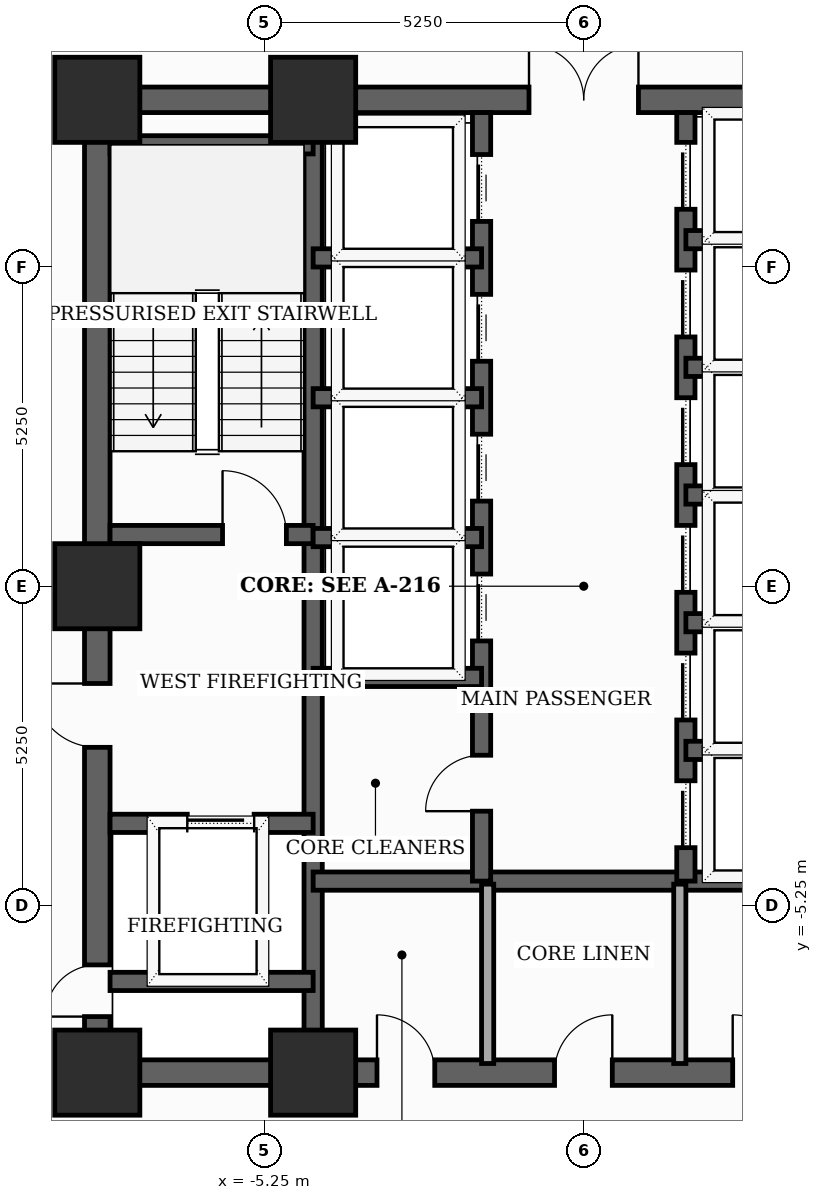
"""IFC4 building model, lengths in metres.
Left out: names, types, materials, properties, quantities, classifications, styles, units other than length and angle.
Written with IfcOpenShell. Run it as: python <this file> out.ifc"""

import sys

from ifc_helpers import new_model, si_unit, direction, frame, frame_2d, origin, origin_2d, place, context, subcontext, project, spatial, rectangle, extrude, element, fill, save


model = new_model("IFC4")
c1 = context("Model", 3, precision=1e-05, world=origin(), true_north=direction((0.0, 1.0)))
c2 = subcontext(c1, "Body", "Model", "MODEL_VIEW")
j1 = project(units=[si_unit("LENGTHUNIT", "METRE"), si_unit("PLANEANGLEUNIT", "RADIAN")], contexts=[c1])
p1 = place(None, origin())
s1 = spatial("IfcSite", under=j1, at=p1, CompositionType="ELEMENT")
p2 = place(p1, origin())
s2 = spatial("IfcBuilding", under=s1, at=p2, CompositionType="ELEMENT")
p3 = place(p2, frame((0.0, 0.0, 108.8)))
s3 = spatial("IfcBuildingStorey", under=s2, at=p3, CompositionType="ELEMENT", Elevation=108.8)
for number, where, z_axis, x_axis in (
    (1, (-8.0, -8.0, 0.0), (0.0, 0.0, 1.0), (1.0, 0.0, 0.0)),
    (2, (-4.45, -8.0, 0.0), (0.0, 0.0, 1.0), (1.0, 0.0, 0.0)),
    (3, (-4.45, 8.0, 0.0), (0.0, 0.0, 1.0), (1.0, 0.0, 0.0)),
    (4, (-8.0, 8.0, 0.0), (0.0, 0.0, 1.0), (1.0, 0.0, 0.0)),
    (5, (-8.0, 0.0, 0.0), (0.0, 0.0, 1.0), (1.0, 0.0, 0.0)),
):
    element("IfcColumn", number, at=place(p3, frame(where, z_axis=z_axis, x_axis=x_axis)), inside=s3, PredefinedType="COLUMN", context=c2, shape_type="SweptSolid", body=[
        extrude(rectangle(XDim=1.4, YDim=1.4, at=origin_2d()), origin(), (0.0, 0.0, 1.0), 3.7),
    ])
p4 = place(p3, frame((-8.0, -8.0, 0.0), z_axis=(0.0, 0.0, 1.0), x_axis=(0.0, 1.0, 0.0)))
e6 = element("IfcWall", 6, at=p4, inside=s3, PredefinedType="SHEAR", context=c2, shape_type="SweptSolid", body=[
    extrude(rectangle(XDim=16.0, YDim=0.42, at=frame_2d((8.0, 0.0))), origin(), (0.0, 0.0, 1.0), 3.5),
])
p5 = place(p4, frame((0.922, 0.0, 0.0)))
e7 = element("IfcOpeningElement", 7, at=p5, cuts=e6, PredefinedType="OPENING", context=c2, shape_type="SweptSolid", body=[
    extrude(rectangle(XDim=0.85, YDim=2.02, at=frame_2d((0.425, 1.01))), frame((0.0, 0.22, 0.0), z_axis=(0.0, -1.0, 0.0), x_axis=(1.0, 0.0, 0.0)), (0.0, 0.0, 1.0), 0.44),
])
p6 = place(p4, frame((5.35, 0.0, 0.0)))
e8 = element("IfcOpeningElement", 8, at=p6, cuts=e6, PredefinedType="OPENING", context=c2, shape_type="SweptSolid", body=[
    extrude(rectangle(XDim=1.05, YDim=2.15, at=frame_2d((0.525, 1.075))), frame((0.0, 0.22, 0.0), z_axis=(0.0, -1.0, 0.0), x_axis=(1.0, 0.0, 0.0)), (0.0, 0.0, 1.0), 0.44),
])
p7 = place(p3, frame((-8.0, -8.0, 0.0), z_axis=(0.0, 0.0, 1.0), x_axis=(1.0, 0.0, 0.0)))
e9 = element("IfcWall", 9, at=p7, inside=s3, PredefinedType="SHEAR", context=c2, shape_type="SweptSolid", body=[
    extrude(rectangle(XDim=16.0, YDim=0.42, at=frame_2d((8.0, 0.0))), origin(), (0.0, 0.0, 1.0), 3.5),
])
p8 = place(p7, frame((4.6, 0.0, 0.0)))
e10 = element("IfcOpeningElement", 10, at=p8, cuts=e9, PredefinedType="OPENING", context=c2, shape_type="SweptSolid", body=[
    extrude(rectangle(XDim=0.95, YDim=2.1, at=frame_2d((0.475, 1.05))), frame((0.0, 0.22, 0.0), z_axis=(0.0, -1.0, 0.0), x_axis=(1.0, 0.0, 0.0)), (0.0, 0.0, 1.0), 0.44),
])
p9 = place(p7, frame((7.52, 0.0, 0.0)))
e11 = element("IfcOpeningElement", 11, at=p9, cuts=e9, PredefinedType="OPENING", context=c2, shape_type="SweptSolid", body=[
    extrude(rectangle(XDim=0.95, YDim=2.1, at=frame_2d((0.475, 1.05))), frame((0.0, 0.22, 0.0), z_axis=(0.0, -1.0, 0.0), x_axis=(1.0, 0.0, 0.0)), (0.0, 0.0, 1.0), 0.44),
])
p10 = place(p7, frame((10.45, 0.0, 0.0)))
e12 = element("IfcOpeningElement", 12, at=p10, cuts=e9, PredefinedType="OPENING", context=c2, shape_type="SweptSolid", body=[
    extrude(rectangle(XDim=0.95, YDim=2.1, at=frame_2d((0.475, 1.05))), frame((0.0, 0.22, 0.0), z_axis=(0.0, -1.0, 0.0), x_axis=(1.0, 0.0, 0.0)), (0.0, 0.0, 1.0), 0.44),
])
p11 = place(p3, frame((-8.0, 8.0, 0.0), z_axis=(0.0, 0.0, 1.0), x_axis=(1.0, 0.0, 0.0)))
e13 = element("IfcWall", 13, at=p11, inside=s3, PredefinedType="SHEAR", context=c2, shape_type="SweptSolid", body=[
    extrude(rectangle(XDim=16.0, YDim=0.42, at=frame_2d((8.0, 0.0))), origin(), (0.0, 0.0, 1.0), 3.5),
])
p12 = place(p11, frame((7.1, 0.0, 0.0)))
e14 = element("IfcOpeningElement", 14, at=p12, cuts=e13, PredefinedType="OPENING", context=c2, shape_type="SweptSolid", body=[
    extrude(rectangle(XDim=1.8, YDim=2.15, at=frame_2d((0.9, 1.075))), frame((0.0, 0.22, 0.0), z_axis=(0.0, -1.0, 0.0), x_axis=(1.0, 0.0, 0.0)), (0.0, 0.0, 1.0), 0.44),
])
p13 = place(p3, frame((-4.45, -7.79, 0.0), z_axis=(0.0, 0.0, 1.0), x_axis=(0.0, 1.0, 0.0)))
e15 = element("IfcWall", 15, at=p13, inside=s3, PredefinedType="SHEAR", context=c2, shape_type="SweptSolid", body=[
    extrude(rectangle(XDim=15.58, YDim=0.3, at=frame_2d((7.79, 0.0))), origin(), (0.0, 0.0, 1.0), 3.5),
])
p14 = place(p3, frame((-7.79, 0.85, 0.0), z_axis=(0.0, 0.0, 1.0), x_axis=(1.0, 0.0, 0.0)))
e16 = element("IfcWall", 16, at=p14, inside=s3, PredefinedType="SHEAR", context=c2, shape_type="SweptSolid", body=[
    extrude(rectangle(XDim=3.34, YDim=0.3, at=frame_2d((1.67, 0.0))), origin(), (0.0, 0.0, 1.0), 3.5),
])
p15 = place(p14, frame((1.85, 0.0, 0.0)))
e17 = element("IfcOpeningElement", 17, at=p15, cuts=e16, PredefinedType="OPENING", context=c2, shape_type="SweptSolid", body=[
    extrude(rectangle(XDim=1.05, YDim=2.15, at=frame_2d((0.525, 1.075))), frame((0.0, 0.16, 0.0), z_axis=(0.0, -1.0, 0.0), x_axis=(1.0, 0.0, 0.0)), (0.0, 0.0, 1.0), 0.32),
])
p16 = place(p3, frame((-7.79, 7.26, 0.0), z_axis=(0.0, 0.0, 1.0), x_axis=(1.0, 0.0, 0.0)))
e18 = element("IfcWall", 18, at=p16, inside=s3, PredefinedType="SHEAR", context=c2, shape_type="SweptSolid", body=[
    extrude(rectangle(XDim=3.34, YDim=0.3, at=frame_2d((1.67, 0.0))), origin(), (0.0, 0.0, 1.0), 3.5),
])
p17 = place(p3, frame((-7.79, -3.9, 0.0), z_axis=(0.0, 0.0, 1.0), x_axis=(1.0, 0.0, 0.0)))
e19 = element("IfcWall", 19, at=p17, inside=s3, PredefinedType="SHEAR", context=c2, shape_type="SweptSolid", body=[
    extrude(rectangle(XDim=3.34, YDim=0.3, at=frame_2d((1.67, 0.0))), origin(), (0.0, 0.0, 1.0), 3.5),
])
p18 = place(p17, frame((1.27, 0.0, 0.0)))
e20 = element("IfcOpeningElement", 20, at=p18, cuts=e19, PredefinedType="OPENING", context=c2, shape_type="SweptSolid", body=[
    extrude(rectangle(XDim=1.1, YDim=2.1, at=frame_2d((0.55, 1.05))), frame((0.0, 0.16, 0.0), z_axis=(0.0, -1.0, 0.0), x_axis=(1.0, 0.0, 0.0)), (0.0, 0.0, 1.0), 0.32),
])
p19 = place(p3, frame((-7.79, -6.5, 0.0), z_axis=(0.0, 0.0, 1.0), x_axis=(1.0, 0.0, 0.0)))
e21 = element("IfcWall", 21, at=p19, inside=s3, PredefinedType="SHEAR", context=c2, shape_type="SweptSolid", body=[
    extrude(rectangle(XDim=3.34, YDim=0.3, at=frame_2d((1.67, 0.0))), origin(), (0.0, 0.0, 1.0), 3.5),
])
p20 = place(p3, frame((-4.45, -4.85, 0.0), z_axis=(0.0, 0.0, 1.0), x_axis=(1.0, 0.0, 0.0)))
e22 = element("IfcWall", 22, at=p20, inside=s3, PredefinedType="SHEAR", context=c2, shape_type="SweptSolid", body=[
    extrude(rectangle(XDim=8.9, YDim=0.3, at=frame_2d((4.45, 0.0))), origin(), (0.0, 0.0, 1.0), 3.5),
])
p21 = place(p3, frame((-1.68, -4.85, 0.0), z_axis=(0.0, 0.0, 1.0), x_axis=(0.0, 1.0, 0.0)))
e23 = element("IfcWall", 23, at=p21, inside=s3, PredefinedType="SHEAR", context=c2, shape_type="SweptSolid", body=[
    extrude(rectangle(XDim=12.64, YDim=0.3, at=frame_2d((6.32, 0.0))), origin(), (0.0, 0.0, 1.0), 3.5),
])
p22 = place(p21, frame((3.95, 0.0, 0.0)))
e24 = element("IfcOpeningElement", 24, at=p22, cuts=e23, PredefinedType="OPENING", context=c2, shape_type="SweptSolid", body=[
    extrude(rectangle(XDim=1.1, YDim=2.1, at=frame_2d((0.55, 1.05))), frame((0.0, 0.16, 0.0), z_axis=(0.0, -1.0, 0.0), x_axis=(1.0, 0.0, 0.0)), (0.0, 0.0, 1.0), 0.32),
])
p23 = place(p21, frame((6.25, 0.0, 0.0)))
e25 = element("IfcOpeningElement", 25, at=p23, cuts=e23, PredefinedType="OPENING", context=c2, shape_type="SweptSolid", body=[
    extrude(rectangle(XDim=1.1, YDim=2.1, at=frame_2d((0.55, 1.05))), frame((0.0, 0.16, 0.0), z_axis=(0.0, -1.0, 0.0), x_axis=(1.0, 0.0, 0.0)), (0.0, 0.0, 1.0), 0.32),
])
p24 = place(p21, frame((8.55, 0.0, 0.0)))
e26 = element("IfcOpeningElement", 26, at=p24, cuts=e23, PredefinedType="OPENING", context=c2, shape_type="SweptSolid", body=[
    extrude(rectangle(XDim=1.1, YDim=2.1, at=frame_2d((0.55, 1.05))), frame((0.0, 0.16, 0.0), z_axis=(0.0, -1.0, 0.0), x_axis=(1.0, 0.0, 0.0)), (0.0, 0.0, 1.0), 0.32),
])
p25 = place(p21, frame((10.85, 0.0, 0.0)))
e27 = element("IfcOpeningElement", 27, at=p25, cuts=e23, PredefinedType="OPENING", context=c2, shape_type="SweptSolid", body=[
    extrude(rectangle(XDim=1.1, YDim=2.1, at=frame_2d((0.55, 1.05))), frame((0.0, 0.16, 0.0), z_axis=(0.0, -1.0, 0.0), x_axis=(1.0, 0.0, 0.0)), (0.0, 0.0, 1.0), 0.32),
])
p26 = place(p21, frame((1.15, 0.0, 0.0)))
e28 = element("IfcOpeningElement", 28, at=p26, cuts=e23, PredefinedType="OPENING", context=c2, shape_type="SweptSolid", body=[
    extrude(rectangle(XDim=0.92, YDim=2.1, at=frame_2d((0.46, 1.05))), frame((0.0, 0.16, 0.0), z_axis=(0.0, -1.0, 0.0), x_axis=(1.0, 0.0, 0.0)), (0.0, 0.0, 1.0), 0.32),
])
p27 = place(p3, frame((1.68, -4.85, 0.0), z_axis=(0.0, 0.0, 1.0), x_axis=(0.0, 1.0, 0.0)))
e29 = element("IfcWall", 29, at=p27, inside=s3, PredefinedType="SHEAR", context=c2, shape_type="SweptSolid", body=[
    extrude(rectangle(XDim=12.64, YDim=0.3, at=frame_2d((6.32, 0.0))), origin(), (0.0, 0.0, 1.0), 3.5),
])
p28 = place(p27, frame((0.55, 0.0, 0.0)))
e30 = element("IfcOpeningElement", 30, at=p28, cuts=e29, PredefinedType="OPENING", context=c2, shape_type="SweptSolid", body=[
    extrude(rectangle(XDim=1.1, YDim=2.1, at=frame_2d((0.55, 1.05))), frame((0.0, 0.16, 0.0), z_axis=(0.0, -1.0, 0.0), x_axis=(1.0, 0.0, 0.0)), (0.0, 0.0, 1.0), 0.32),
])
p29 = place(p27, frame((2.65, 0.0, 0.0)))
e31 = element("IfcOpeningElement", 31, at=p29, cuts=e29, PredefinedType="OPENING", context=c2, shape_type="SweptSolid", body=[
    extrude(rectangle(XDim=1.1, YDim=2.1, at=frame_2d((0.55, 1.05))), frame((0.0, 0.16, 0.0), z_axis=(0.0, -1.0, 0.0), x_axis=(1.0, 0.0, 0.0)), (0.0, 0.0, 1.0), 0.32),
])
p30 = place(p27, frame((4.75, 0.0, 0.0)))
e32 = element("IfcOpeningElement", 32, at=p30, cuts=e29, PredefinedType="OPENING", context=c2, shape_type="SweptSolid", body=[
    extrude(rectangle(XDim=1.1, YDim=2.1, at=frame_2d((0.55, 1.05))), frame((0.0, 0.16, 0.0), z_axis=(0.0, -1.0, 0.0), x_axis=(1.0, 0.0, 0.0)), (0.0, 0.0, 1.0), 0.32),
])
p31 = place(p27, frame((6.85, 0.0, 0.0)))
e33 = element("IfcOpeningElement", 33, at=p31, cuts=e29, PredefinedType="OPENING", context=c2, shape_type="SweptSolid", body=[
    extrude(rectangle(XDim=1.1, YDim=2.1, at=frame_2d((0.55, 1.05))), frame((0.0, 0.16, 0.0), z_axis=(0.0, -1.0, 0.0), x_axis=(1.0, 0.0, 0.0)), (0.0, 0.0, 1.0), 0.32),
])
p32 = place(p27, frame((8.95, 0.0, 0.0)))
e34 = element("IfcOpeningElement", 34, at=p32, cuts=e29, PredefinedType="OPENING", context=c2, shape_type="SweptSolid", body=[
    extrude(rectangle(XDim=1.1, YDim=2.1, at=frame_2d((0.55, 1.05))), frame((0.0, 0.16, 0.0), z_axis=(0.0, -1.0, 0.0), x_axis=(1.0, 0.0, 0.0)), (0.0, 0.0, 1.0), 0.32),
])
p33 = place(p27, frame((11.05, 0.0, 0.0)))
e35 = element("IfcOpeningElement", 35, at=p33, cuts=e29, PredefinedType="OPENING", context=c2, shape_type="SweptSolid", body=[
    extrude(rectangle(XDim=1.1, YDim=2.1, at=frame_2d((0.55, 1.05))), frame((0.0, 0.16, 0.0), z_axis=(0.0, -1.0, 0.0), x_axis=(1.0, 0.0, 0.0)), (0.0, 0.0, 1.0), 0.32),
])
for number, where, z_axis, x_axis in (
    (36, (-4.45, -1.5, 0.0), (0.0, 0.0, 1.0), (1.0, 0.0, 0.0)),
    (37, (-4.45, 0.8, 0.0), (0.0, 0.0, 1.0), (1.0, 0.0, 0.0)),
    (38, (-4.45, 3.1, 0.0), (0.0, 0.0, 1.0), (1.0, 0.0, 0.0)),
    (39, (-4.45, 5.4, 0.0), (0.0, 0.0, 1.0), (1.0, 0.0, 0.0)),
    (40, (1.68, 1.5, 0.0), (0.0, 0.0, 1.0), (1.0, 0.0, 0.0)),
    (41, (1.68, 3.6, 0.0), (0.0, 0.0, 1.0), (1.0, 0.0, 0.0)),
    (42, (1.68, 5.7, 0.0), (0.0, 0.0, 1.0), (1.0, 0.0, 0.0)),
    (43, (1.68, -2.7, 0.0), (0.0, 0.0, 1.0), (1.0, 0.0, 0.0)),
    (44, (1.68, -0.6, 0.0), (0.0, 0.0, 1.0), (1.0, 0.0, 0.0)),
):
    element("IfcWall", number, at=place(p3, frame(where, z_axis=z_axis, x_axis=x_axis)), inside=s3, PredefinedType="SHEAR", context=c2, shape_type="SweptSolid", body=[
        extrude(rectangle(XDim=2.77, YDim=0.3, at=frame_2d((1.385, 0.0))), origin(), (0.0, 0.0, 1.0), 3.5),
    ])
for number, where, z_axis, x_axis in (
    (45, (-1.58, -7.85, 0.0), (0.0, 0.0, 1.0), (0.0, 1.0, 0.0)),
    (46, (1.58, -7.85, 0.0), (0.0, 0.0, 1.0), (0.0, 1.0, 0.0)),
):
    element("IfcWall", number, at=place(p3, frame(where, z_axis=z_axis, x_axis=x_axis)), inside=s3, PredefinedType="SOLIDWALL", context=c2, shape_type="SweptSolid", body=[
        extrude(rectangle(XDim=2.95, YDim=0.2, at=frame_2d((1.475, 0.0))), origin(), (0.0, 0.0, 1.0), 2.885),
    ])
p34 = place(p5, origin())
e47 = element("IfcDoor", 47, at=p34, inside=s3, OperationType="SINGLE_SWING_LEFT", PredefinedType="TRAPDOOR", context=c2, shape_type="SweptSolid", body=[
    extrude(rectangle(XDim=0.85, YDim=2.02, at=frame_2d((0.425, 1.01))), frame((0.0, 0.025, 0.0), z_axis=(0.0, -1.0, 0.0), x_axis=(1.0, 0.0, 0.0)), (0.0, 0.0, 1.0), 0.05),
])
fill(e7, e47)
p35 = place(p6, origin())
e48 = element("IfcDoor", 48, at=p35, inside=s3, OperationType="SINGLE_SWING_RIGHT", PredefinedType="DOOR", context=c2, shape_type="SweptSolid", body=[
    extrude(rectangle(XDim=1.05, YDim=2.15, at=frame_2d((0.525, 1.075))), frame((0.0, 0.025, 0.0), z_axis=(0.0, -1.0, 0.0), x_axis=(1.0, 0.0, 0.0)), (0.0, 0.0, 1.0), 0.05),
])
fill(e8, e48)
p36 = place(p8, origin())
e49 = element("IfcDoor", 49, at=p36, inside=s3, OperationType="SINGLE_SWING_LEFT", PredefinedType="DOOR", context=c2, shape_type="SweptSolid", body=[
    extrude(rectangle(XDim=0.95, YDim=2.1, at=frame_2d((0.475, 1.05))), frame((0.0, 0.025, 0.0), z_axis=(0.0, -1.0, 0.0), x_axis=(1.0, 0.0, 0.0)), (0.0, 0.0, 1.0), 0.05),
])
fill(e10, e49)
p37 = place(p9, origin())
e50 = element("IfcDoor", 50, at=p37, inside=s3, OperationType="SINGLE_SWING_RIGHT", PredefinedType="DOOR", context=c2, shape_type="SweptSolid", body=[
    extrude(rectangle(XDim=0.95, YDim=2.1, at=frame_2d((0.475, 1.05))), frame((0.0, 0.025, 0.0), z_axis=(0.0, -1.0, 0.0), x_axis=(1.0, 0.0, 0.0)), (0.0, 0.0, 1.0), 0.05),
])
fill(e11, e50)
p38 = place(p10, origin())
e51 = element("IfcDoor", 51, at=p38, inside=s3, OperationType="SINGLE_SWING_LEFT", PredefinedType="DOOR", context=c2, shape_type="SweptSolid", body=[
    extrude(rectangle(XDim=0.95, YDim=2.1, at=frame_2d((0.475, 1.05))), frame((0.0, 0.025, 0.0), z_axis=(0.0, -1.0, 0.0), x_axis=(1.0, 0.0, 0.0)), (0.0, 0.0, 1.0), 0.05),
])
fill(e12, e51)
p39 = place(p12, origin())
e52 = element("IfcDoor", 52, at=p39, inside=s3, OperationType="DOUBLE_DOOR_SINGLE_SWING", PredefinedType="DOOR", context=c2, shape_type="SweptSolid", body=[
    extrude(rectangle(XDim=1.8, YDim=2.15, at=frame_2d((0.9, 1.075))), frame((0.0, 0.025, 0.0), z_axis=(0.0, -1.0, 0.0), x_axis=(1.0, 0.0, 0.0)), (0.0, 0.0, 1.0), 0.05),
])
fill(e14, e52)
p40 = place(p15, origin())
e53 = element("IfcDoor", 53, at=p40, inside=s3, OperationType="SINGLE_SWING_LEFT", PredefinedType="DOOR", context=c2, shape_type="SweptSolid", body=[
    extrude(rectangle(XDim=1.05, YDim=2.15, at=frame_2d((0.525, 1.075))), frame((0.0, 0.025, 0.0), z_axis=(0.0, -1.0, 0.0), x_axis=(1.0, 0.0, 0.0)), (0.0, 0.0, 1.0), 0.05),
])
fill(e17, e53)
p41 = place(p18, origin())
e54 = element("IfcDoor", 54, at=p41, inside=s3, OperationType="SLIDING_TO_LEFT", PredefinedType="DOOR", context=c2, shape_type="SweptSolid", body=[
    extrude(rectangle(XDim=1.1, YDim=2.1, at=frame_2d((0.55, 1.05))), frame((0.0, 0.025, 0.0), z_axis=(0.0, -1.0, 0.0), x_axis=(1.0, 0.0, 0.0)), (0.0, 0.0, 1.0), 0.05),
])
fill(e20, e54)
p42 = place(p22, origin())
e55 = element("IfcDoor", 55, at=p42, inside=s3, OperationType="SLIDING_TO_LEFT", PredefinedType="DOOR", context=c2, shape_type="SweptSolid", body=[
    extrude(rectangle(XDim=1.1, YDim=2.1, at=frame_2d((0.55, 1.05))), frame((0.0, 0.025, 0.0), z_axis=(0.0, -1.0, 0.0), x_axis=(1.0, 0.0, 0.0)), (0.0, 0.0, 1.0), 0.05),
])
fill(e24, e55)
p43 = place(p23, origin())
e56 = element("IfcDoor", 56, at=p43, inside=s3, OperationType="SLIDING_TO_LEFT", PredefinedType="DOOR", context=c2, shape_type="SweptSolid", body=[
    extrude(rectangle(XDim=1.1, YDim=2.1, at=frame_2d((0.55, 1.05))), frame((0.0, 0.025, 0.0), z_axis=(0.0, -1.0, 0.0), x_axis=(1.0, 0.0, 0.0)), (0.0, 0.0, 1.0), 0.05),
])
fill(e25, e56)
p44 = place(p24, origin())
e57 = element("IfcDoor", 57, at=p44, inside=s3, OperationType="SLIDING_TO_LEFT", PredefinedType="DOOR", context=c2, shape_type="SweptSolid", body=[
    extrude(rectangle(XDim=1.1, YDim=2.1, at=frame_2d((0.55, 1.05))), frame((0.0, 0.025, 0.0), z_axis=(0.0, -1.0, 0.0), x_axis=(1.0, 0.0, 0.0)), (0.0, 0.0, 1.0), 0.05),
])
fill(e26, e57)
p45 = place(p25, origin())
e58 = element("IfcDoor", 58, at=p45, inside=s3, OperationType="SLIDING_TO_LEFT", PredefinedType="DOOR", context=c2, shape_type="SweptSolid", body=[
    extrude(rectangle(XDim=1.1, YDim=2.1, at=frame_2d((0.55, 1.05))), frame((0.0, 0.025, 0.0), z_axis=(0.0, -1.0, 0.0), x_axis=(1.0, 0.0, 0.0)), (0.0, 0.0, 1.0), 0.05),
])
fill(e27, e58)
p46 = place(p26, origin())
e59 = element("IfcDoor", 59, at=p46, inside=s3, OperationType="SINGLE_SWING_LEFT", PredefinedType="DOOR", context=c2, shape_type="SweptSolid", body=[
    extrude(rectangle(XDim=0.92, YDim=2.1, at=frame_2d((0.46, 1.05))), frame((0.0, 0.025, 0.0), z_axis=(0.0, -1.0, 0.0), x_axis=(1.0, 0.0, 0.0)), (0.0, 0.0, 1.0), 0.05),
])
fill(e28, e59)
p47 = place(p28, origin())
e60 = element("IfcDoor", 60, at=p47, inside=s3, OperationType="SLIDING_TO_LEFT", PredefinedType="DOOR", context=c2, shape_type="SweptSolid", body=[
    extrude(rectangle(XDim=1.1, YDim=2.1, at=frame_2d((0.55, 1.05))), frame((0.0, 0.025, 0.0), z_axis=(0.0, -1.0, 0.0), x_axis=(1.0, 0.0, 0.0)), (0.0, 0.0, 1.0), 0.05),
])
fill(e30, e60)
p48 = place(p29, origin())
e61 = element("IfcDoor", 61, at=p48, inside=s3, OperationType="SLIDING_TO_LEFT", PredefinedType="DOOR", context=c2, shape_type="SweptSolid", body=[
    extrude(rectangle(XDim=1.1, YDim=2.1, at=frame_2d((0.55, 1.05))), frame((0.0, 0.025, 0.0), z_axis=(0.0, -1.0, 0.0), x_axis=(1.0, 0.0, 0.0)), (0.0, 0.0, 1.0), 0.05),
])
fill(e31, e61)
p49 = place(p30, origin())
e62 = element("IfcDoor", 62, at=p49, inside=s3, OperationType="SLIDING_TO_LEFT", PredefinedType="DOOR", context=c2, shape_type="SweptSolid", body=[
    extrude(rectangle(XDim=1.1, YDim=2.1, at=frame_2d((0.55, 1.05))), frame((0.0, 0.025, 0.0), z_axis=(0.0, -1.0, 0.0), x_axis=(1.0, 0.0, 0.0)), (0.0, 0.0, 1.0), 0.05),
])
fill(e32, e62)
p50 = place(p31, origin())
e63 = element("IfcDoor", 63, at=p50, inside=s3, OperationType="SLIDING_TO_LEFT", PredefinedType="DOOR", context=c2, shape_type="SweptSolid", body=[
    extrude(rectangle(XDim=1.1, YDim=2.1, at=frame_2d((0.55, 1.05))), frame((0.0, 0.025, 0.0), z_axis=(0.0, -1.0, 0.0), x_axis=(1.0, 0.0, 0.0)), (0.0, 0.0, 1.0), 0.05),
])
fill(e33, e63)
p51 = place(p32, origin())
e64 = element("IfcDoor", 64, at=p51, inside=s3, OperationType="SLIDING_TO_LEFT", PredefinedType="DOOR", context=c2, shape_type="SweptSolid", body=[
    extrude(rectangle(XDim=1.1, YDim=2.1, at=frame_2d((0.55, 1.05))), frame((0.0, 0.025, 0.0), z_axis=(0.0, -1.0, 0.0), x_axis=(1.0, 0.0, 0.0)), (0.0, 0.0, 1.0), 0.05),
])
fill(e34, e64)
p52 = place(p33, origin())
e65 = element("IfcDoor", 65, at=p52, inside=s3, OperationType="SLIDING_TO_LEFT", PredefinedType="DOOR", context=c2, shape_type="SweptSolid", body=[
    extrude(rectangle(XDim=1.1, YDim=2.1, at=frame_2d((0.55, 1.05))), frame((0.0, 0.025, 0.0), z_axis=(0.0, -1.0, 0.0), x_axis=(1.0, 0.0, 0.0)), (0.0, 0.0, 1.0), 0.05),
])
fill(e35, e65)
save(model, sys.argv[1])
